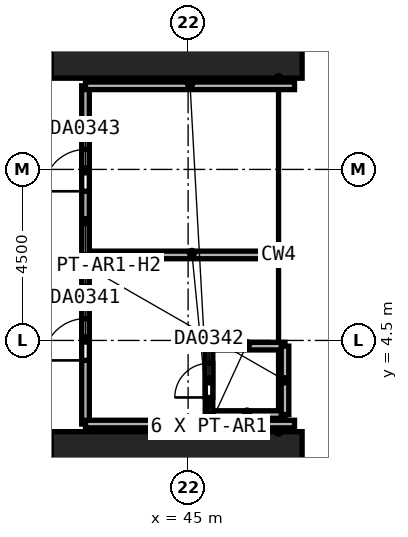
"""IFC4 building model, lengths in metres.
Left out: names, types, materials, properties, quantities, classifications, styles, units other than length and angle.
Written with IfcOpenShell. Run it as: python <this file> out.ifc"""

import sys

from ifc_helpers import new_model, si_unit, direction, frame, frame_2d, origin, origin_2d, place, context, subcontext, project, spatial, rectangle, extrude, element, fill, save


model = new_model("IFC4")
c1 = context("Model", 3, precision=1e-05, world=origin(), true_north=direction((0.0, 1.0)))
c2 = subcontext(c1, "Body", "Model", "MODEL_VIEW")
j1 = project(units=[si_unit("LENGTHUNIT", "METRE"), si_unit("PLANEANGLEUNIT", "RADIAN")], contexts=[c1])
p1 = place(None, origin())
s1 = spatial("IfcSite", under=j1, at=p1, CompositionType="ELEMENT")
p2 = place(p1, origin())
s2 = spatial("IfcBuilding", under=s1, at=p2, CompositionType="ELEMENT")
p3 = place(p2, frame((0.0, 0.0, 12.0)))
s3 = spatial("IfcBuildingStorey", under=s2, at=p3, CompositionType="ELEMENT", Elevation=12.0)
for number, where, z_axis, x_axis in (
    (1, (44.7, 0.0, 0.0), (0.0, 0.0, 1.0), (0.0, 1.0, 0.0)),
    (2, (44.7, 13.5, 0.0), (0.0, 0.0, 1.0), (0.0, 1.0, 0.0)),
):
    element("IfcColumn", number, at=place(p3, frame(where, z_axis=z_axis, x_axis=x_axis)), inside=s3, PredefinedType="COLUMN", context=c2, shape_type="SweptSolid", body=[
        extrude(rectangle(XDim=4.2, YDim=6.6, at=origin_2d()), origin(), (0.0, 0.0, 1.0), 7.0),
    ])
p4 = place(p3, frame((42.3, 2.3, 0.0), z_axis=(0.0, 0.0, 1.0), x_axis=(0.0, 1.0, 0.0)))
e3 = element("IfcWall", 3, at=p4, inside=s3, PredefinedType="PARTITIONING", context=c2, shape_type="SweptSolid", body=[
    extrude(rectangle(XDim=4.45, YDim=0.2, at=frame_2d((2.225, 0.0))), origin(), (0.0, 0.0, 1.0), 5.5),
])
p5 = place(p4, frame((1.675, 0.0, 0.0)))
e4 = element("IfcOpeningElement", 4, at=p5, cuts=e3, PredefinedType="OPENING", context=c2, shape_type="SweptSolid", body=[
    extrude(rectangle(XDim=1.1, YDim=2.4, at=frame_2d((0.55, 1.2))), frame((0.0, 0.1, 0.0), z_axis=(0.0, -1.0, 0.0), x_axis=(1.0, 0.0, 0.0)), (0.0, 0.0, 1.0), 0.2),
])
for number, where, z_axis, x_axis in (
    (5, (42.3, 2.3, 0.0), (0.0, 0.0, 1.0), (1.0, 0.0, 0.0)),
    (6, (42.3, 6.75, 0.0), (0.0, 0.0, 1.0), (1.0, 0.0, 0.0)),
):
    element("IfcWall", number, at=place(p3, frame(where, z_axis=z_axis, x_axis=x_axis)), inside=s3, PredefinedType="PARTITIONING", context=c2, shape_type="SweptSolid", body=[
        extrude(rectangle(XDim=5.5, YDim=0.2, at=frame_2d((2.75, 0.0))), origin(), (0.0, 0.0, 1.0), 6.7),
    ])
for number, where, z_axis, x_axis in (
    (7, (45.55, 2.55, 0.0), (0.0, 0.0, 1.0), (1.0, 0.0, 0.0)),
    (8, (47.55, 4.35, 0.0), (0.0, 0.0, 1.0), (-1.0, 0.0, 0.0)),
):
    element("IfcWall", number, at=place(p3, frame(where, z_axis=z_axis, x_axis=x_axis)), inside=s3, PredefinedType="PARTITIONING", context=c2, shape_type="SweptSolid", body=[
        extrude(rectangle(XDim=2.0, YDim=0.2, at=frame_2d((1.0, 0.0))), origin(), (0.0, 0.0, 1.0), 6.7),
    ])
p6 = place(p3, frame((47.55, 2.55, 0.0), z_axis=(0.0, 0.0, 1.0), x_axis=(0.0, 1.0, 0.0)))
e9 = element("IfcWall", 9, at=p6, inside=s3, PredefinedType="PARTITIONING", context=c2, shape_type="SweptSolid", body=[
    extrude(rectangle(XDim=1.8, YDim=0.2, at=frame_2d((0.9, 0.0))), origin(), (0.0, 0.0, 1.0), 5.5),
])
p7 = place(p3, frame((45.55, 2.55, 0.0), z_axis=(0.0, 0.0, 1.0), x_axis=(0.0, 1.0, 0.0)))
e10 = element("IfcWall", 10, at=p7, inside=s3, PredefinedType="PARTITIONING", context=c2, shape_type="SweptSolid", body=[
    extrude(rectangle(XDim=1.8, YDim=0.2, at=frame_2d((0.9, 0.0))), origin(), (0.0, 0.0, 1.0), 6.7),
])
p8 = place(p7, frame((0.45, 0.0, 0.0)))
e11 = element("IfcOpeningElement", 11, at=p8, cuts=e10, PredefinedType="OPENING", context=c2, shape_type="SweptSolid", body=[
    extrude(rectangle(XDim=0.9, YDim=2.1, at=frame_2d((0.45, 1.05))), frame((0.0, 0.1, 0.0), z_axis=(0.0, -1.0, 0.0), x_axis=(1.0, 0.0, 0.0)), (0.0, 0.0, 1.0), 0.2),
])
p9 = place(p3, frame((42.3, 6.75, 0.0), z_axis=(0.0, 0.0, 1.0), x_axis=(0.0, 1.0, 0.0)))
e12 = element("IfcWall", 12, at=p9, inside=s3, PredefinedType="PARTITIONING", context=c2, shape_type="SweptSolid", body=[
    extrude(rectangle(XDim=4.45, YDim=0.2, at=frame_2d((2.225, 0.0))), origin(), (0.0, 0.0, 1.0), 5.5),
])
p10 = place(p9, frame((1.675, 0.0, 0.0)))
e13 = element("IfcOpeningElement", 13, at=p10, cuts=e12, PredefinedType="OPENING", context=c2, shape_type="SweptSolid", body=[
    extrude(rectangle(XDim=1.1, YDim=2.4, at=frame_2d((0.55, 1.2))), frame((0.0, 0.1, 0.0), z_axis=(0.0, -1.0, 0.0), x_axis=(1.0, 0.0, 0.0)), (0.0, 0.0, 1.0), 0.2),
])
p11 = place(p3, frame((42.3, 11.2, 0.0), z_axis=(0.0, 0.0, 1.0), x_axis=(1.0, 0.0, 0.0)))
e14 = element("IfcWall", 14, at=p11, inside=s3, PredefinedType="PARTITIONING", context=c2, shape_type="SweptSolid", body=[
    extrude(rectangle(XDim=5.5, YDim=0.2, at=frame_2d((2.75, 0.0))), origin(), (0.0, 0.0, 1.0), 6.7),
])
p12 = place(p5, origin())
e15 = element("IfcDoor", 15, at=p12, inside=s3, OperationType="DOUBLE_DOOR_SINGLE_SWING", PredefinedType="DOOR", context=c2, shape_type="SweptSolid", body=[
    extrude(rectangle(XDim=1.1, YDim=2.4, at=frame_2d((0.55, 1.2))), frame((0.0, 0.025, 0.0), z_axis=(0.0, -1.0, 0.0), x_axis=(1.0, 0.0, 0.0)), (0.0, 0.0, 1.0), 0.05),
])
fill(e4, e15)
p13 = place(p8, origin())
e16 = element("IfcDoor", 16, at=p13, inside=s3, OperationType="SINGLE_SWING_LEFT", PredefinedType="DOOR", context=c2, shape_type="SweptSolid", body=[
    extrude(rectangle(XDim=0.9, YDim=2.1, at=frame_2d((0.45, 1.05))), frame((0.0, 0.025, 0.0), z_axis=(0.0, -1.0, 0.0), x_axis=(1.0, 0.0, 0.0)), (0.0, 0.0, 1.0), 0.05),
])
fill(e11, e16)
p14 = place(p10, origin())
e17 = element("IfcDoor", 17, at=p14, inside=s3, OperationType="DOUBLE_DOOR_SINGLE_SWING", PredefinedType="DOOR", context=c2, shape_type="SweptSolid", body=[
    extrude(rectangle(XDim=1.1, YDim=2.4, at=frame_2d((0.55, 1.2))), frame((0.0, 0.025, 0.0), z_axis=(0.0, -1.0, 0.0), x_axis=(1.0, 0.0, 0.0)), (0.0, 0.0, 1.0), 0.05),
])
fill(e13, e17)
save(model, sys.argv[1])
